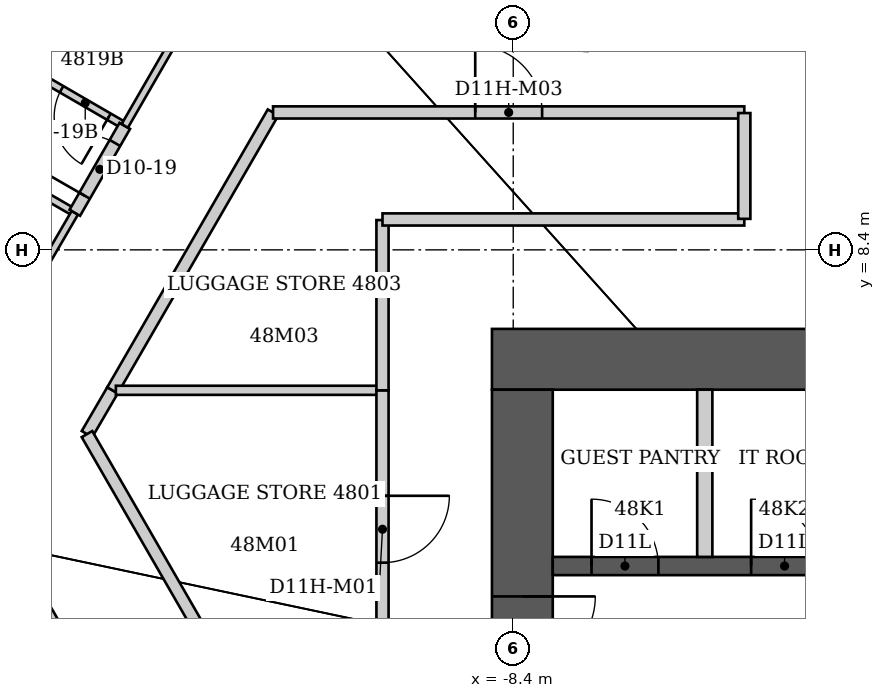
"""IFC4 building model, lengths in metres.
Left out: names, types, materials, properties, quantities, classifications, styles, units other than length and angle.
Written with IfcOpenShell. Run it as: python <this file> out.ifc"""

import sys

from ifc_helpers import new_model, si_unit, direction, frame, frame_2d, origin, place, context, subcontext, project, spatial, rectangle, extrude, element, fill, save


model = new_model("IFC4")
c1 = context("Model", 3, precision=1e-05, world=origin(), true_north=direction((0.0, 1.0)))
c2 = subcontext(c1, "Body", "Model", "MODEL_VIEW")
j1 = project(units=[si_unit("LENGTHUNIT", "METRE"), si_unit("PLANEANGLEUNIT", "RADIAN")], contexts=[c1])
p1 = place(None, origin())
s1 = spatial("IfcSite", under=j1, at=p1, CompositionType="ELEMENT")
p2 = place(p1, origin())
s2 = spatial("IfcBuilding", under=s1, at=p2, CompositionType="ELEMENT")
p3 = place(p2, frame((0.0, 0.0, 194.6)))
s3 = spatial("IfcBuildingStorey", under=s2, at=p3, CompositionType="ELEMENT", Elevation=194.6)
p4 = place(p3, frame((-8.75, 6.6, 0.0), z_axis=(0.0, 0.0, 1.0), x_axis=(1.0, 0.0, 0.0)))
e1 = element("IfcWall", 1, at=p4, inside=s3, PredefinedType="SHEAR", context=c2, shape_type="SweptSolid", body=[
    extrude(rectangle(XDim=17.5, YDim=1.0, at=frame_2d((8.75, 0.0))), origin(), (0.0, 0.0, 1.0), 3.8),
])
p5 = place(p4, frame((6.887, 0.0, 0.0)))
e2 = element("IfcOpeningElement", 2, at=p5, cuts=e1, PredefinedType="OPENING", context=c2, shape_type="SweptSolid", body=[
    extrude(rectangle(XDim=1.1, YDim=2.1, at=frame_2d((0.55, 1.05))), frame((0.0, 0.5, 0.0), z_axis=(0.0, -1.0, 0.0), x_axis=(1.0, 0.0, 0.0)), (0.0, 0.0, 1.0), 1.0),
])
p6 = place(p4, frame((9.512, 0.0, 0.0)))
e3 = element("IfcOpeningElement", 3, at=p6, cuts=e1, PredefinedType="OPENING", context=c2, shape_type="SweptSolid", body=[
    extrude(rectangle(XDim=1.1, YDim=2.1, at=frame_2d((0.55, 1.05))), frame((0.0, 0.5, 0.0), z_axis=(0.0, -1.0, 0.0), x_axis=(1.0, 0.0, 0.0)), (0.0, 0.0, 1.0), 1.0),
])
p7 = place(p4, frame((12.137, 0.0, 0.0)))
e4 = element("IfcOpeningElement", 4, at=p7, cuts=e1, PredefinedType="OPENING", context=c2, shape_type="SweptSolid", body=[
    extrude(rectangle(XDim=1.1, YDim=2.1, at=frame_2d((0.55, 1.05))), frame((0.0, 0.5, 0.0), z_axis=(0.0, -1.0, 0.0), x_axis=(1.0, 0.0, 0.0)), (0.0, 0.0, 1.0), 1.0),
])
p8 = place(p4, frame((14.762, 0.0, 0.0)))
e5 = element("IfcOpeningElement", 5, at=p8, cuts=e1, PredefinedType="OPENING", context=c2, shape_type="SweptSolid", body=[
    extrude(rectangle(XDim=1.1, YDim=2.1, at=frame_2d((0.55, 1.05))), frame((0.0, 0.5, 0.0), z_axis=(0.0, -1.0, 0.0), x_axis=(1.0, 0.0, 0.0)), (0.0, 0.0, 1.0), 1.0),
])
p9 = place(p3, frame((-8.25, -6.1, 0.0), z_axis=(0.0, 0.0, 1.0), x_axis=(0.0, 1.0, 0.0)))
e6 = element("IfcWall", 6, at=p9, inside=s3, PredefinedType="SHEAR", context=c2, shape_type="SweptSolid", body=[
    extrude(rectangle(XDim=12.2, YDim=1.0, at=frame_2d((6.1, 0.0))), origin(), (0.0, 0.0, 1.0), 3.8),
])
p10 = place(p9, frame((7.6, 0.0, 0.0)))
e7 = element("IfcOpeningElement", 7, at=p10, cuts=e6, PredefinedType="OPENING", context=c2, shape_type="SweptSolid", body=[
    extrude(rectangle(XDim=1.2, YDim=2.2, at=frame_2d((0.6, 1.1))), frame((0.0, 0.5, 0.0), z_axis=(0.0, -1.0, 0.0), x_axis=(1.0, 0.0, 0.0)), (0.0, 0.0, 1.0), 1.0),
])
p11 = place(p3, frame((-7.75, 3.2, 0.0), z_axis=(0.0, 0.0, 1.0), x_axis=(1.0, 0.0, 0.0)))
e8 = element("IfcWall", 8, at=p11, inside=s3, PredefinedType="SHEAR", context=c2, shape_type="SweptSolid", body=[
    extrude(rectangle(XDim=15.5, YDim=0.3, at=frame_2d((7.75, 0.0))), origin(), (0.0, 0.0, 1.0), 3.8),
])
p12 = place(p11, frame((0.637, 0.0, 0.0)))
e9 = element("IfcOpeningElement", 9, at=p12, cuts=e8, PredefinedType="OPENING", context=c2, shape_type="SweptSolid", body=[
    extrude(rectangle(XDim=1.1, YDim=2.2, at=frame_2d((0.55, 1.1))), frame((0.0, 0.15, 0.0), z_axis=(0.0, -1.0, 0.0), x_axis=(1.0, 0.0, 0.0)), (0.0, 0.0, 1.0), 0.3),
])
p13 = place(p11, frame((3.262, 0.0, 0.0)))
e10 = element("IfcOpeningElement", 10, at=p13, cuts=e8, PredefinedType="OPENING", context=c2, shape_type="SweptSolid", body=[
    extrude(rectangle(XDim=1.1, YDim=2.2, at=frame_2d((0.55, 1.1))), frame((0.0, 0.15, 0.0), z_axis=(0.0, -1.0, 0.0), x_axis=(1.0, 0.0, 0.0)), (0.0, 0.0, 1.0), 0.3),
])
p14 = place(p3, frame((-5.25, 3.35, 0.0), z_axis=(0.0, 0.0, 1.0), x_axis=(0.0, 1.0, 0.0)))
e11 = element("IfcWall", 11, at=p14, inside=s3, PredefinedType="PARTITIONING", context=c2, shape_type="SweptSolid", body=[
    extrude(rectangle(XDim=2.75, YDim=0.25, at=frame_2d((1.375, 0.0))), origin(), (0.0, 0.0, 1.0), 3.8),
])
p15 = place(p3, frame((-17.88, 10.32, 0.0), z_axis=(0.0, 0.0, 1.0), x_axis=(0.866114241029, -0.499846097802, 0.0)))
e12 = element("IfcWall", 12, at=p15, inside=s3, PredefinedType="PARTITIONING", context=c2, shape_type="SweptSolid", body=[
    extrude(rectangle(XDim=2.621, YDim=0.12, at=frame_2d((1.311, 0.0))), origin(), (0.0, 0.0, 1.0), 2.878),
])
p16 = place(p3, frame((-17.05, 11.75, 0.0), z_axis=(0.0, 0.0, 1.0), x_axis=(0.865155281359, -0.50150407689, 0.0)))
e13 = element("IfcWall", 13, at=p16, inside=s3, PredefinedType="PARTITIONING", context=c2, shape_type="SweptSolid", body=[
    extrude(rectangle(XDim=2.612, YDim=0.12, at=frame_2d((1.306, 0.0))), origin(), (0.0, 0.0, 1.0), 3.64),
])
p17 = place(p16, frame((1.412, 0.0, 0.0)))
e14 = element("IfcOpeningElement", 14, at=p17, cuts=e13, PredefinedType="OPENING", context=c2, shape_type="SweptSolid", body=[
    extrude(rectangle(XDim=0.9, YDim=2.03, at=frame_2d((0.45, 1.015))), frame((0.0, 0.06, 0.0), z_axis=(0.0, -1.0, 0.0), x_axis=(1.0, 0.0, 0.0)), (0.0, 0.0, 1.0), 0.12),
])
p18 = place(p3, frame((-16.82, 6.93, 0.0), z_axis=(0.0, 0.0, 1.0), x_axis=(0.502810888564, 0.864396442809, 0.0)))
e15 = element("IfcWall", 15, at=p18, inside=s3, PredefinedType="PARTITIONING", context=c2, shape_type="SweptSolid", body=[
    extrude(rectangle(XDim=2.406, YDim=0.12, at=frame_2d((1.203, 0.0))), origin(), (0.0, 0.0, 1.0), 3.64),
])
p19 = place(p3, frame((-16.447, 3.172, 0.0), z_axis=(0.0, 0.0, 1.0), x_axis=(0.499242543719, -0.86646227993, 0.0)))
e16 = element("IfcWall", 16, at=p19, inside=s3, PredefinedType="PARTITIONING", context=c2, shape_type="SweptSolid", body=[
    extrude(rectangle(XDim=2.437, YDim=0.12, at=frame_2d((1.219, 0.0))), origin(), (0.0, 0.0, 1.0), 3.64),
])
p20 = place(p3, frame((-15.61, 9.01, 0.0), z_axis=(0.0, 0.0, 1.0), x_axis=(0.498354254121, 0.866973492905, 0.0)))
e17 = element("IfcWall", 17, at=p20, inside=s3, PredefinedType="PARTITIONING", context=c2, shape_type="SweptSolid", body=[
    extrude(rectangle(XDim=1.648, YDim=0.2, at=frame_2d((0.824, 0.0))), origin(), (0.0, 0.0, 1.0), 3.64),
])
p21 = place(p20, frame((0.324, 0.0, 0.0)))
e18 = element("IfcOpeningElement", 18, at=p21, cuts=e17, PredefinedType="OPENING", context=c2, shape_type="SweptSolid", body=[
    extrude(rectangle(XDim=1.0, YDim=2.13, at=frame_2d((0.5, 1.065))), frame((0.0, 0.1, 0.0), z_axis=(0.0, -1.0, 0.0), x_axis=(1.0, 0.0, 0.0)), (0.0, 0.0, 1.0), 0.2),
])
p22 = place(p3, frame((-15.41, 5.37, 0.0), z_axis=(0.0, 0.0, 1.0), x_axis=(0.503943891868, 0.863736391412, 0.0)))
e19 = element("IfcWall", 19, at=p22, inside=s3, PredefinedType="PARTITIONING", context=c2, shape_type="SweptSolid", body=[
    extrude(rectangle(XDim=0.833, YDim=0.2, at=frame_2d((0.417, 0.0))), origin(), (0.0, 0.0, 1.0), 3.64),
])
p23 = place(p3, frame((-14.99, 6.09, 0.0), z_axis=(0.0, 0.0, 1.0), x_axis=(0.500213626659, 0.86590203124, 0.0)))
e20 = element("IfcWall", 20, at=p23, inside=s3, PredefinedType="PARTITIONING", context=c2, shape_type="SweptSolid", body=[
    extrude(rectangle(XDim=5.278, YDim=0.2, at=frame_2d((2.639, 0.0))), origin(), (0.0, 0.0, 1.0), 3.64),
])
p24 = place(p3, frame((-14.935, 6.09, 0.0), z_axis=(0.0, 0.0, 1.0), x_axis=(1.0, 0.0, 0.0)))
e21 = element("IfcWall", 21, at=p24, inside=s3, PredefinedType="PARTITIONING", context=c2, shape_type="SweptSolid", body=[
    extrude(rectangle(XDim=4.385, YDim=0.15, at=frame_2d((2.192, 0.0))), origin(), (0.0, 0.0, 1.0), 3.64),
])
p25 = place(p3, frame((-14.789, 10.439, 0.0), z_axis=(0.0, 0.0, 1.0), x_axis=(0.499942119333, 0.866058818624, 0.0)))
e22 = element("IfcWall", 22, at=p25, inside=s3, PredefinedType="PARTITIONING", context=c2, shape_type="SweptSolid", body=[
    extrude(rectangle(XDim=2.437, YDim=0.12, at=frame_2d((1.219, 0.0))), origin(), (0.0, 0.0, 1.0), 3.64),
])
p26 = place(p3, frame((-13.19, 1.52, 0.0), z_axis=(0.0, 0.0, 1.0), x_axis=(-0.499513190454, 0.866306281036, 0.0)))
e23 = element("IfcWall", 23, at=p26, inside=s3, PredefinedType="PARTITIONING", context=c2, shape_type="SweptSolid", body=[
    extrude(rectangle(XDim=4.444, YDim=0.2, at=frame_2d((2.222, 0.0))), origin(), (0.0, 0.0, 1.0), 3.64),
])
p27 = place(p3, frame((-12.35, 10.66, 0.0), z_axis=(0.0, 0.0, 1.0), x_axis=(1.0, 0.0, 0.0)))
e24 = element("IfcWall", 24, at=p27, inside=s3, PredefinedType="PARTITIONING", context=c2, shape_type="SweptSolid", body=[
    extrude(rectangle(XDim=7.75, YDim=0.2, at=frame_2d((3.875, 0.0))), origin(), (0.0, 0.0, 1.0), 3.64),
])
p28 = place(p27, frame((3.325, 0.0, 0.0)))
e25 = element("IfcOpeningElement", 25, at=p28, cuts=e24, PredefinedType="OPENING", context=c2, shape_type="SweptSolid", body=[
    extrude(rectangle(XDim=1.1, YDim=2.2, at=frame_2d((0.55, 1.1))), frame((0.0, 0.1, 0.0), z_axis=(0.0, -1.0, 0.0), x_axis=(1.0, 0.0, 0.0)), (0.0, 0.0, 1.0), 0.2),
])
p29 = place(p3, frame((-10.55, 6.09, 0.0), z_axis=(0.0, 0.0, 1.0), x_axis=(0.0, -1.0, 0.0)))
e26 = element("IfcWall", 26, at=p29, inside=s3, PredefinedType="PARTITIONING", context=c2, shape_type="SweptSolid", body=[
    extrude(rectangle(XDim=4.57, YDim=0.2, at=frame_2d((2.285, 0.0))), origin(), (0.0, 0.0, 1.0), 3.64),
])
p30 = place(p29, frame((1.735, 0.0, 0.0)))
e27 = element("IfcOpeningElement", 27, at=p30, cuts=e26, PredefinedType="OPENING", context=c2, shape_type="SweptSolid", body=[
    extrude(rectangle(XDim=1.1, YDim=2.2, at=frame_2d((0.55, 1.1))), frame((0.0, 0.1, 0.0), z_axis=(0.0, -1.0, 0.0), x_axis=(1.0, 0.0, 0.0)), (0.0, 0.0, 1.0), 0.2),
])
p31 = place(p3, frame((-10.55, 8.89, 0.0), z_axis=(0.0, 0.0, 1.0), x_axis=(0.0, -1.0, 0.0)))
e28 = element("IfcWall", 28, at=p31, inside=s3, PredefinedType="PARTITIONING", context=c2, shape_type="SweptSolid", body=[
    extrude(rectangle(XDim=2.8, YDim=0.2, at=frame_2d((1.4, 0.0))), origin(), (0.0, 0.0, 1.0), 3.64),
])
p32 = place(p3, frame((-4.6, 8.9, 0.0), z_axis=(0.0, 0.0, 1.0), x_axis=(-1.0, 0.0, 0.0)))
e29 = element("IfcWall", 29, at=p32, inside=s3, PredefinedType="PARTITIONING", context=c2, shape_type="SweptSolid", body=[
    extrude(rectangle(XDim=5.95, YDim=0.2, at=frame_2d((2.975, 0.0))), origin(), (0.0, 0.0, 1.0), 3.64),
])
p33 = place(p3, frame((-4.6, 10.65, 0.0), z_axis=(0.0, 0.0, 1.0), x_axis=(0.0, -1.0, 0.0)))
e30 = element("IfcWall", 30, at=p33, inside=s3, PredefinedType="PARTITIONING", context=c2, shape_type="SweptSolid", body=[
    extrude(rectangle(XDim=1.74, YDim=0.2, at=frame_2d((0.87, 0.0))), origin(), (0.0, 0.0, 1.0), 3.64),
])
p34 = place(p21, origin())
e31 = element("IfcDoor", 31, at=p34, inside=s3, OperationType="SINGLE_SWING_LEFT", PredefinedType="DOOR", context=c2, shape_type="SweptSolid", body=[
    extrude(rectangle(XDim=1.0, YDim=2.13, at=frame_2d((0.5, 1.065))), frame((0.0, 0.025, 0.0), z_axis=(0.0, -1.0, 0.0), x_axis=(1.0, 0.0, 0.0)), (0.0, 0.0, 1.0), 0.05),
])
fill(e18, e31)
p35 = place(p17, origin())
e32 = element("IfcDoor", 32, at=p35, inside=s3, OperationType="SINGLE_SWING_RIGHT", PredefinedType="DOOR", context=c2, shape_type="SweptSolid", body=[
    extrude(rectangle(XDim=0.9, YDim=2.03, at=frame_2d((0.45, 1.015))), frame((0.0, 0.025, 0.0), z_axis=(0.0, -1.0, 0.0), x_axis=(1.0, 0.0, 0.0)), (0.0, 0.0, 1.0), 0.05),
])
fill(e14, e32)
p36 = place(p30, origin())
e33 = element("IfcDoor", 33, at=p36, inside=s3, OperationType="SINGLE_SWING_LEFT", PredefinedType="DOOR", context=c2, shape_type="SweptSolid", body=[
    extrude(rectangle(XDim=1.1, YDim=2.2, at=frame_2d((0.55, 1.1))), frame((0.0, 0.025, 0.0), z_axis=(0.0, -1.0, 0.0), x_axis=(1.0, 0.0, 0.0)), (0.0, 0.0, 1.0), 0.05),
])
fill(e27, e33)
p37 = place(p28, origin())
e34 = element("IfcDoor", 34, at=p37, inside=s3, OperationType="SINGLE_SWING_LEFT", PredefinedType="DOOR", context=c2, shape_type="SweptSolid", body=[
    extrude(rectangle(XDim=1.1, YDim=2.2, at=frame_2d((0.55, 1.1))), frame((0.0, 0.025, 0.0), z_axis=(0.0, -1.0, 0.0), x_axis=(1.0, 0.0, 0.0)), (0.0, 0.0, 1.0), 0.05),
])
fill(e25, e34)
p38 = place(p10, origin())
e35 = element("IfcDoor", 35, at=p38, inside=s3, OperationType="SINGLE_SWING_RIGHT", PredefinedType="DOOR", context=c2, shape_type="SweptSolid", body=[
    extrude(rectangle(XDim=1.2, YDim=2.2, at=frame_2d((0.6, 1.1))), frame((0.0, 0.025, 0.0), z_axis=(0.0, -1.0, 0.0), x_axis=(1.0, 0.0, 0.0)), (0.0, 0.0, 1.0), 0.05),
])
fill(e7, e35)
p39 = place(p12, origin())
e36 = element("IfcDoor", 36, at=p39, inside=s3, OperationType="SINGLE_SWING_LEFT", PredefinedType="DOOR", context=c2, shape_type="SweptSolid", body=[
    extrude(rectangle(XDim=1.1, YDim=2.2, at=frame_2d((0.55, 1.1))), frame((0.0, 0.025, 0.0), z_axis=(0.0, -1.0, 0.0), x_axis=(1.0, 0.0, 0.0)), (0.0, 0.0, 1.0), 0.05),
])
fill(e9, e36)
p40 = place(p13, origin())
e37 = element("IfcDoor", 37, at=p40, inside=s3, OperationType="SINGLE_SWING_LEFT", PredefinedType="DOOR", context=c2, shape_type="SweptSolid", body=[
    extrude(rectangle(XDim=1.1, YDim=2.2, at=frame_2d((0.55, 1.1))), frame((0.0, 0.025, 0.0), z_axis=(0.0, -1.0, 0.0), x_axis=(1.0, 0.0, 0.0)), (0.0, 0.0, 1.0), 0.05),
])
fill(e10, e37)
save(model, sys.argv[1])
